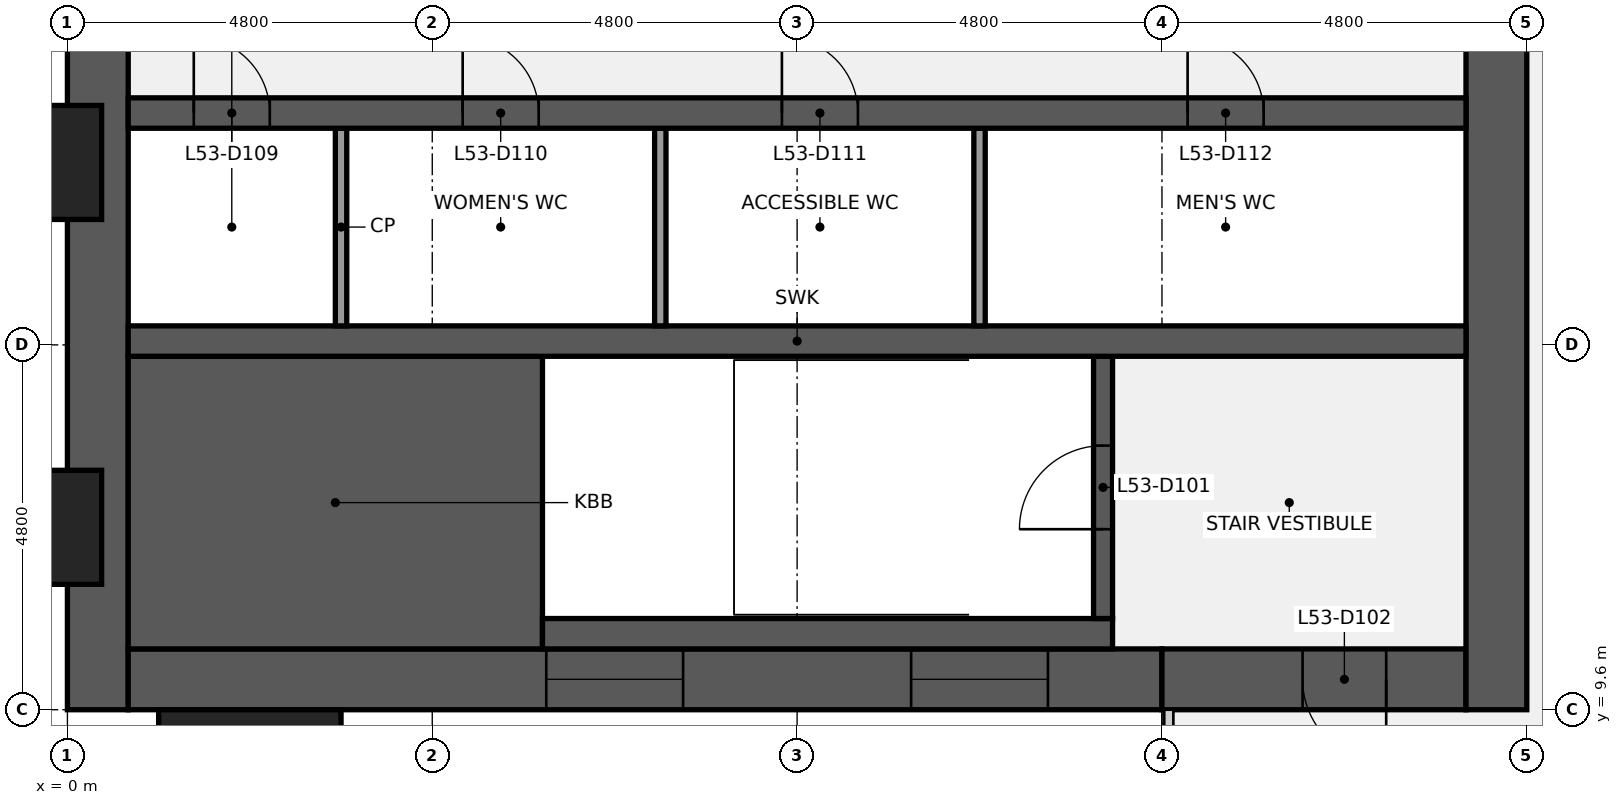
"""IFC4 building model, lengths in metres.
Left out: names, types, materials, properties, quantities, classifications, styles, units other than length and angle.
Written with IfcOpenShell. Run it as: python <this file> out.ifc"""

import sys

from ifc_helpers import new_model, si_unit, direction, frame, frame_2d, origin, origin_2d, place, context, subcontext, project, spatial, rectangle, extrude, element, fill, save


model = new_model("IFC4")
c1 = context("Model", 3, precision=1e-05, world=origin(), true_north=direction((0.0, 1.0)))
c2 = subcontext(c1, "Body", "Model", "MODEL_VIEW")
j1 = project(units=[si_unit("LENGTHUNIT", "METRE"), si_unit("PLANEANGLEUNIT", "RADIAN")], contexts=[c1])
p1 = place(None, origin())
s1 = spatial("IfcSite", under=j1, at=p1, CompositionType="ELEMENT")
p2 = place(p1, origin())
s2 = spatial("IfcBuilding", under=s1, at=p2, CompositionType="ELEMENT")
p3 = place(p2, frame((0.0, 0.0, 241.2)))
s3 = spatial("IfcBuildingStorey", under=s2, at=p3, CompositionType="ELEMENT", Elevation=241.2)
p4 = place(p3, frame((0.4, 9.6, 0.0), z_axis=(0.0, 0.0, 1.0), x_axis=(0.0, 1.0, 0.0)))
e1 = element("IfcWall", 1, at=p4, inside=s3, PredefinedType="SHEAR", context=c2, shape_type="SweptSolid", body=[
    extrude(rectangle(XDim=28.8, YDim=0.8, at=frame_2d((14.4, 0.0))), origin(), (0.0, 0.0, 1.0), 3.84),
])
p5 = place(p4, frame((8.85, 0.0, 0.9)))
e2 = element("IfcOpeningElement", 2, at=p5, cuts=e1, PredefinedType="OPENING", context=c2, shape_type="SweptSolid", body=[
    extrude(rectangle(XDim=1.5, YDim=1.5, at=frame_2d((0.75, 0.75))), frame((0.0, 0.41, 0.0), z_axis=(0.0, -1.0, 0.0), x_axis=(1.0, 0.0, 0.0)), (0.0, 0.0, 1.0), 0.82),
])
p6 = place(p4, frame((18.45, 0.0, 0.9)))
e3 = element("IfcOpeningElement", 3, at=p6, cuts=e1, PredefinedType="OPENING", context=c2, shape_type="SweptSolid", body=[
    extrude(rectangle(XDim=1.5, YDim=1.5, at=frame_2d((0.75, 0.75))), frame((0.0, 0.41, 0.0), z_axis=(0.0, -1.0, 0.0), x_axis=(1.0, 0.0, 0.0)), (0.0, 0.0, 1.0), 0.82),
])
p7 = place(p3, frame((14.4, 10.0, 0.0), z_axis=(0.0, 0.0, 1.0), x_axis=(-1.0, 0.0, 0.0)))
e4 = element("IfcWall", 4, at=p7, inside=s3, PredefinedType="SHEAR", context=c2, shape_type="SweptSolid", body=[
    extrude(rectangle(XDim=13.6, YDim=0.8, at=frame_2d((6.8, 0.0))), origin(), (0.0, 0.0, 1.0), 3.84),
])
p8 = place(p7, frame((6.3, 0.0, 0.9)))
e5 = element("IfcOpeningElement", 5, at=p8, cuts=e4, PredefinedType="OPENING", context=c2, shape_type="SweptSolid", body=[
    extrude(rectangle(XDim=1.8, YDim=1.5, at=frame_2d((0.9, 0.75))), frame((0.0, 0.41, 0.0), z_axis=(0.0, -1.0, 0.0), x_axis=(1.0, 0.0, 0.0)), (0.0, 0.0, 1.0), 0.82),
])
p9 = place(p7, frame((1.5, 0.0, 0.9)))
e6 = element("IfcOpeningElement", 6, at=p9, cuts=e4, PredefinedType="OPENING", context=c2, shape_type="SweptSolid", body=[
    extrude(rectangle(XDim=1.8, YDim=1.5, at=frame_2d((0.9, 0.75))), frame((0.0, 0.41, 0.0), z_axis=(0.0, -1.0, 0.0), x_axis=(1.0, 0.0, 0.0)), (0.0, 0.0, 1.0), 0.82),
])
p10 = place(p3, frame((18.4, 10.0, 0.0), z_axis=(0.0, 0.0, 1.0), x_axis=(-1.0, 0.0, 0.0)))
e7 = element("IfcWall", 7, at=p10, inside=s3, PredefinedType="SHEAR", context=c2, shape_type="SweptSolid", body=[
    extrude(rectangle(XDim=4.0, YDim=0.8, at=frame_2d((2.0, 0.0))), origin(), (0.0, 0.0, 1.0), 3.84),
])
p11 = place(p10, frame((1.05, 0.0, 0.0)))
e8 = element("IfcOpeningElement", 8, at=p11, cuts=e7, PredefinedType="OPENING", context=c2, shape_type="SweptSolid", body=[
    extrude(rectangle(XDim=1.1, YDim=2.1, at=frame_2d((0.55, 1.05))), frame((0.0, 0.41, 0.0), z_axis=(0.0, -1.0, 0.0), x_axis=(1.0, 0.0, 0.0)), (0.0, 0.0, 1.0), 0.82),
])
p12 = place(p3, frame((18.8, 38.4, 0.0), z_axis=(0.0, 0.0, 1.0), x_axis=(0.0, -1.0, 0.0)))
e9 = element("IfcWall", 9, at=p12, inside=s3, PredefinedType="SHEAR", context=c2, shape_type="SweptSolid", body=[
    extrude(rectangle(XDim=28.8, YDim=0.8, at=frame_2d((14.4, 0.0))), origin(), (0.0, 0.0, 1.0), 3.84),
])
p13 = place(p12, frame((18.3, 0.0, 0.0)))
e10 = element("IfcOpeningElement", 10, at=p13, cuts=e9, PredefinedType="OPENING", context=c2, shape_type="SweptSolid", body=[
    extrude(rectangle(XDim=1.8, YDim=2.1, at=frame_2d((0.9, 1.05))), frame((0.0, 0.41, 0.0), z_axis=(0.0, -1.0, 0.0), x_axis=(1.0, 0.0, 0.0)), (0.0, 0.0, 1.0), 0.82),
])
p14 = place(p12, frame((8.7, 0.0, 0.0)))
e11 = element("IfcOpeningElement", 11, at=p14, cuts=e9, PredefinedType="OPENING", context=c2, shape_type="SweptSolid", body=[
    extrude(rectangle(XDim=1.8, YDim=2.1, at=frame_2d((0.9, 1.05))), frame((0.0, 0.41, 0.0), z_axis=(0.0, -1.0, 0.0), x_axis=(1.0, 0.0, 0.0)), (0.0, 0.0, 1.0), 0.82),
])
p15 = place(p3, frame((0.8, 12.325, 0.0), z_axis=(0.0, 0.0, 1.0), x_axis=(1.0, 0.0, 0.0)))
e12 = element("IfcWall", 12, at=p15, inside=s3, PredefinedType="SHEAR", context=c2, shape_type="SweptSolid", body=[
    extrude(rectangle(XDim=5.45, YDim=3.85, at=frame_2d((2.725, 0.0))), origin(), (0.0, 0.0, 1.0), 3.84),
])
p16 = place(p3, frame((6.25, 10.6, 0.0), z_axis=(0.0, 0.0, 1.0), x_axis=(1.0, 0.0, 0.0)))
e13 = element("IfcWall", 13, at=p16, inside=s3, PredefinedType="SHEAR", context=c2, shape_type="SweptSolid", body=[
    extrude(rectangle(XDim=7.5, YDim=0.4, at=frame_2d((3.75, 0.0))), origin(), (0.0, 0.0, 1.0), 3.84),
])
p17 = place(p3, frame((13.625, 10.8, 0.0), z_axis=(0.0, 0.0, 1.0), x_axis=(0.0, 1.0, 0.0)))
e14 = element("IfcWall", 14, at=p17, inside=s3, PredefinedType="SHEAR", context=c2, shape_type="SweptSolid", body=[
    extrude(rectangle(XDim=3.45, YDim=0.25, at=frame_2d((1.725, 0.0))), origin(), (0.0, 0.0, 1.0), 3.84),
])
p18 = place(p17, frame((1.175, 0.0, 0.0)))
e15 = element("IfcOpeningElement", 15, at=p18, cuts=e14, PredefinedType="OPENING", context=c2, shape_type="SweptSolid", body=[
    extrude(rectangle(XDim=1.1, YDim=2.1, at=frame_2d((0.55, 1.05))), frame((0.0, 0.135, 0.0), z_axis=(0.0, -1.0, 0.0), x_axis=(1.0, 0.0, 0.0)), (0.0, 0.0, 1.0), 0.27),
])
p19 = place(p3, frame((0.8, 14.45, 0.0), z_axis=(0.0, 0.0, 1.0), x_axis=(1.0, 0.0, 0.0)))
e16 = element("IfcWall", 16, at=p19, inside=s3, PredefinedType="SHEAR", context=c2, shape_type="SweptSolid", body=[
    extrude(rectangle(XDim=17.6, YDim=0.4, at=frame_2d((8.8, 0.0))), origin(), (0.0, 0.0, 1.0), 3.84),
])
for number, where, z_axis, x_axis in (
    (17, (3.6, 14.65, 0.0), (0.0, 0.0, 1.0), (0.0, 1.0, 0.0)),
    (18, (7.8, 14.65, 0.0), (0.0, 0.0, 1.0), (0.0, 1.0, 0.0)),
    (19, (12.0, 14.65, 0.0), (0.0, 0.0, 1.0), (0.0, 1.0, 0.0)),
):
    element("IfcWall", number, at=place(p3, frame(where, z_axis=z_axis, x_axis=x_axis)), inside=s3, PredefinedType="PARTITIONING", context=c2, shape_type="SweptSolid", body=[
        extrude(rectangle(XDim=2.6, YDim=0.15, at=frame_2d((1.3, 0.0))), origin(), (0.0, 0.0, 1.0), 3.84),
    ])
p20 = place(p3, frame((0.8, 17.45, 0.0), z_axis=(0.0, 0.0, 1.0), x_axis=(1.0, 0.0, 0.0)))
e20 = element("IfcWall", 20, at=p20, inside=s3, PredefinedType="SHEAR", context=c2, shape_type="SweptSolid", body=[
    extrude(rectangle(XDim=17.6, YDim=0.4, at=frame_2d((8.8, 0.0))), origin(), (0.0, 0.0, 1.0), 3.84),
])
p21 = place(p20, frame((0.863, 0.0, 0.0)))
e21 = element("IfcOpeningElement", 21, at=p21, cuts=e20, PredefinedType="OPENING", context=c2, shape_type="SweptSolid", body=[
    extrude(rectangle(XDim=1.0, YDim=2.1, at=frame_2d((0.5, 1.05))), frame((0.0, 0.21, 0.0), z_axis=(0.0, -1.0, 0.0), x_axis=(1.0, 0.0, 0.0)), (0.0, 0.0, 1.0), 0.42),
])
p22 = place(p20, frame((4.4, 0.0, 0.0)))
e22 = element("IfcOpeningElement", 22, at=p22, cuts=e20, PredefinedType="OPENING", context=c2, shape_type="SweptSolid", body=[
    extrude(rectangle(XDim=1.0, YDim=2.1, at=frame_2d((0.5, 1.05))), frame((0.0, 0.21, 0.0), z_axis=(0.0, -1.0, 0.0), x_axis=(1.0, 0.0, 0.0)), (0.0, 0.0, 1.0), 0.42),
])
p23 = place(p20, frame((8.6, 0.0, 0.0)))
e23 = element("IfcOpeningElement", 23, at=p23, cuts=e20, PredefinedType="OPENING", context=c2, shape_type="SweptSolid", body=[
    extrude(rectangle(XDim=1.0, YDim=2.1, at=frame_2d((0.5, 1.05))), frame((0.0, 0.21, 0.0), z_axis=(0.0, -1.0, 0.0), x_axis=(1.0, 0.0, 0.0)), (0.0, 0.0, 1.0), 0.42),
])
p24 = place(p20, frame((13.938, 0.0, 0.0)))
e24 = element("IfcOpeningElement", 24, at=p24, cuts=e20, PredefinedType="OPENING", context=c2, shape_type="SweptSolid", body=[
    extrude(rectangle(XDim=1.0, YDim=2.1, at=frame_2d((0.5, 1.05))), frame((0.0, 0.21, 0.0), z_axis=(0.0, -1.0, 0.0), x_axis=(1.0, 0.0, 0.0)), (0.0, 0.0, 1.0), 0.42),
])
for number, where, z_axis, x_axis in (
    (25, (-0.75, 12.0, 0.0), (0.0, 0.0, 1.0), (0.0, 1.0, 0.0)),
    (26, (-0.75, 16.8, 0.0), (0.0, 0.0, 1.0), (0.0, 1.0, 0.0)),
    (27, (2.4, 8.85, 0.0), (0.0, 0.0, 1.0), (1.0, 0.0, 0.0)),
):
    element("IfcColumn", number, at=place(p3, frame(where, z_axis=z_axis, x_axis=x_axis)), inside=s3, PredefinedType="PILASTER", context=c2, shape_type="SweptSolid", body=[
        extrude(rectangle(XDim=2.4, YDim=1.5, at=origin_2d()), origin(), (0.0, 0.0, 1.0), 4.0),
    ])
p25 = place(p18, origin())
e28 = element("IfcDoor", 28, at=p25, inside=s3, OperationType="SINGLE_SWING_LEFT", PredefinedType="DOOR", context=c2, shape_type="SweptSolid", body=[
    extrude(rectangle(XDim=1.1, YDim=2.1, at=frame_2d((0.55, 1.05))), frame((0.0, 0.025, 0.0), z_axis=(0.0, -1.0, 0.0), x_axis=(1.0, 0.0, 0.0)), (0.0, 0.0, 1.0), 0.05),
])
fill(e15, e28)
p26 = place(p11, origin())
e29 = element("IfcDoor", 29, at=p26, inside=s3, OperationType="SINGLE_SWING_LEFT", PredefinedType="DOOR", context=c2, shape_type="SweptSolid", body=[
    extrude(rectangle(XDim=1.1, YDim=2.1, at=frame_2d((0.55, 1.05))), frame((0.0, 0.025, 0.0), z_axis=(0.0, -1.0, 0.0), x_axis=(1.0, 0.0, 0.0)), (0.0, 0.0, 1.0), 0.05),
])
fill(e8, e29)
p27 = place(p21, origin())
e30 = element("IfcDoor", 30, at=p27, inside=s3, OperationType="SINGLE_SWING_LEFT", PredefinedType="DOOR", context=c2, shape_type="SweptSolid", body=[
    extrude(rectangle(XDim=1.0, YDim=2.1, at=frame_2d((0.5, 1.05))), frame((0.0, 0.025, 0.0), z_axis=(0.0, -1.0, 0.0), x_axis=(1.0, 0.0, 0.0)), (0.0, 0.0, 1.0), 0.05),
])
fill(e21, e30)
p28 = place(p22, origin())
e31 = element("IfcDoor", 31, at=p28, inside=s3, OperationType="SINGLE_SWING_LEFT", PredefinedType="DOOR", context=c2, shape_type="SweptSolid", body=[
    extrude(rectangle(XDim=1.0, YDim=2.1, at=frame_2d((0.5, 1.05))), frame((0.0, 0.025, 0.0), z_axis=(0.0, -1.0, 0.0), x_axis=(1.0, 0.0, 0.0)), (0.0, 0.0, 1.0), 0.05),
])
fill(e22, e31)
p29 = place(p23, origin())
e32 = element("IfcDoor", 32, at=p29, inside=s3, OperationType="SINGLE_SWING_LEFT", PredefinedType="DOOR", context=c2, shape_type="SweptSolid", body=[
    extrude(rectangle(XDim=1.0, YDim=2.1, at=frame_2d((0.5, 1.05))), frame((0.0, 0.025, 0.0), z_axis=(0.0, -1.0, 0.0), x_axis=(1.0, 0.0, 0.0)), (0.0, 0.0, 1.0), 0.05),
])
fill(e23, e32)
p30 = place(p24, origin())
e33 = element("IfcDoor", 33, at=p30, inside=s3, OperationType="SINGLE_SWING_LEFT", PredefinedType="DOOR", context=c2, shape_type="SweptSolid", body=[
    extrude(rectangle(XDim=1.0, YDim=2.1, at=frame_2d((0.5, 1.05))), frame((0.0, 0.025, 0.0), z_axis=(0.0, -1.0, 0.0), x_axis=(1.0, 0.0, 0.0)), (0.0, 0.0, 1.0), 0.05),
])
fill(e24, e33)
p31 = place(p8, origin())
e34 = element("IfcWindow", 34, at=p31, inside=s3, PartitioningType="SINGLE_PANEL", PredefinedType="WINDOW", context=c2, shape_type="SweptSolid", body=[
    extrude(rectangle(XDim=1.8, YDim=1.5, at=frame_2d((0.9, 0.75))), frame((0.0, 0.03, 0.0), z_axis=(0.0, -1.0, 0.0), x_axis=(1.0, 0.0, 0.0)), (0.0, 0.0, 1.0), 0.06),
])
fill(e5, e34)
p32 = place(p9, origin())
e35 = element("IfcWindow", 35, at=p32, inside=s3, PartitioningType="SINGLE_PANEL", PredefinedType="WINDOW", context=c2, shape_type="SweptSolid", body=[
    extrude(rectangle(XDim=1.8, YDim=1.5, at=frame_2d((0.9, 0.75))), frame((0.0, 0.03, 0.0), z_axis=(0.0, -1.0, 0.0), x_axis=(1.0, 0.0, 0.0)), (0.0, 0.0, 1.0), 0.06),
])
fill(e6, e35)
save(model, sys.argv[1])
